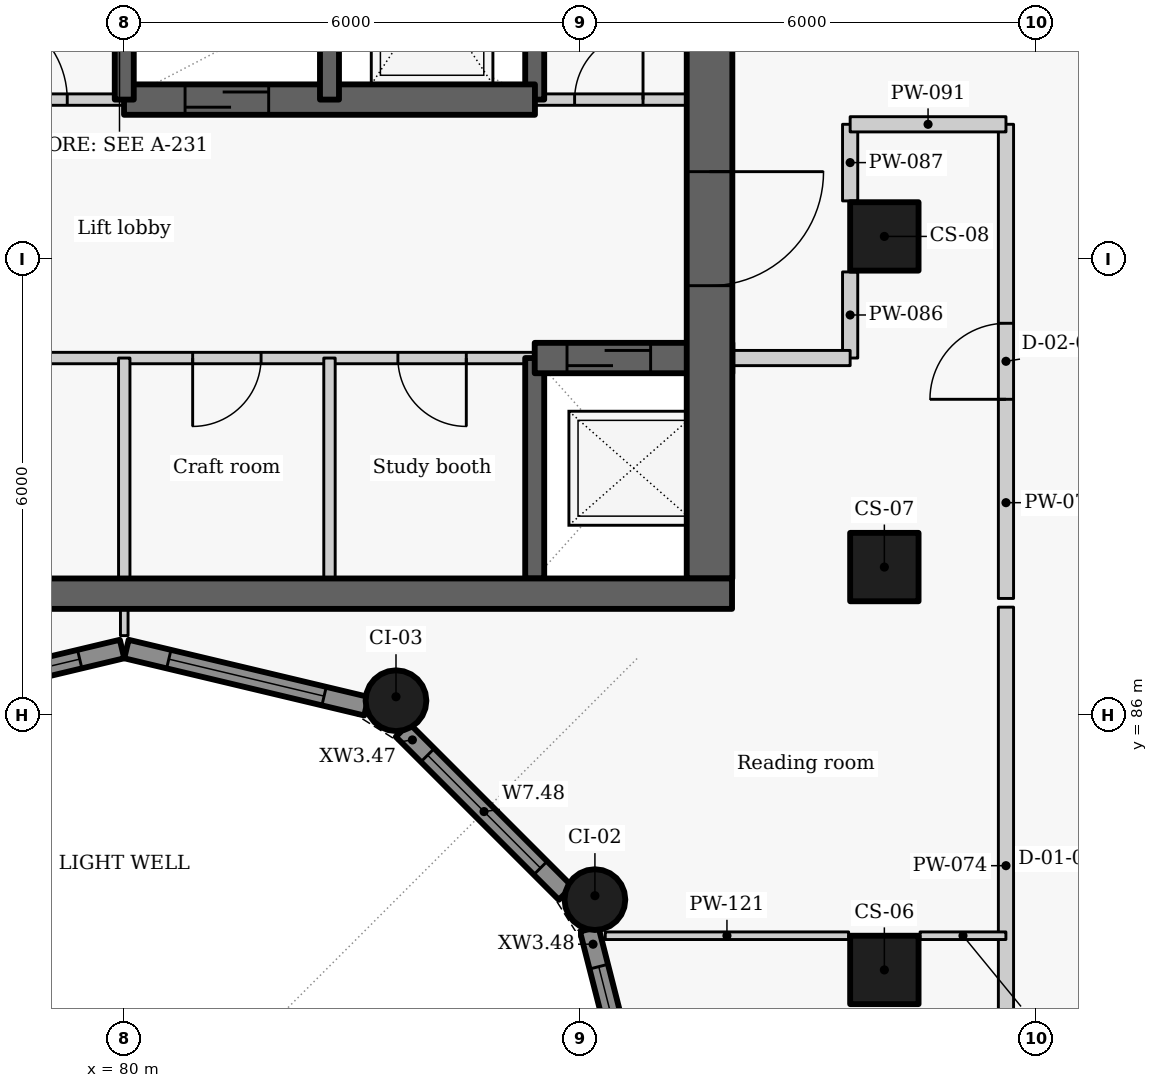
"""IFC4 building model, lengths in metres.
Left out: names, types, materials, properties, quantities, classifications, styles, units other than length and angle.
Written with IfcOpenShell. Run it as: python <this file> out.ifc"""

import sys

from ifc_helpers import new_model, si_unit, direction, frame, frame_2d, origin, origin_2d, place, context, subcontext, project, spatial, rectangle, circle, extrude, element, fill, save


model = new_model("IFC4")
c1 = context("Model", 3, precision=1e-05, world=origin(), true_north=direction((0.0, 1.0)))
c2 = subcontext(c1, "Body", "Model", "MODEL_VIEW")
j1 = project(units=[si_unit("LENGTHUNIT", "METRE"), si_unit("PLANEANGLEUNIT", "RADIAN")], contexts=[c1])
p1 = place(None, origin())
s1 = spatial("IfcSite", under=j1, at=p1, CompositionType="ELEMENT")
p2 = place(p1, origin())
s2 = spatial("IfcBuilding", under=s1, at=p2, CompositionType="ELEMENT")
p3 = place(p2, frame((0.0, 0.0, 176.7)))
s3 = spatial("IfcBuildingStorey", under=s2, at=p3, CompositionType="ELEMENT", Elevation=176.7)
for number, where, z_axis, x_axis in (
    (1, (90.0, 82.65, 0.0), (0.0, 0.0, 1.0), (0.0, 1.0, 0.0)),
    (2, (90.0, 87.95, 0.0), (0.0, 0.0, 1.0), (0.0, 1.0, 0.0)),
    (3, (90.0, 92.3, 0.0), (0.0, 0.0, 1.0), (0.0, 1.0, 0.0)),
):
    element("IfcColumn", number, at=place(p3, frame(where, z_axis=z_axis, x_axis=x_axis)), inside=s3, PredefinedType="COLUMN", context=c2, shape_type="SweptSolid", body=[
        extrude(rectangle(XDim=0.9, YDim=0.9, at=origin_2d()), origin(), (0.0, 0.0, 1.0), 3.3),
    ])
for number, where, z_axis, x_axis in (
    (4, (86.192, 83.575, 0.0), (0.0, 0.0, 1.0), (-0.5, 0.866, 0.0)),
    (5, (83.575, 86.192, 0.0), (0.0, 0.0, 1.0), (-0.866, 0.5, 0.0)),
):
    element("IfcColumn", number, at=place(p3, frame(where, z_axis=z_axis, x_axis=x_axis)), inside=s3, PredefinedType="COLUMN", context=c2, shape_type="SweptSolid", body=[
        extrude(circle(Radius=0.4, at=origin_2d()), origin(), (0.0, 0.0, 1.0), 3.3),
    ])
p4 = place(p3, frame((76.814, 86.119, 0.0), z_axis=(0.0, 0.0, 1.0), x_axis=(0.972773113459, 0.231759508395, 0.0)))
e6 = element("IfcWall", 6, at=p4, inside=s3, PredefinedType="SOLIDWALL", context=c2, shape_type="SweptSolid", body=[
    extrude(rectangle(XDim=3.246, YDim=0.25, at=frame_2d((1.623, 0.0))), origin(), (0.0, 0.0, 1.0), 2.425),
])
p5 = place(p4, frame((0.573, 0.0, 0.9)))
e7 = element("IfcOpeningElement", 7, at=p5, cuts=e6, PredefinedType="OPENING", context=c2, shape_type="SweptSolid", body=[
    extrude(rectangle(XDim=2.1, YDim=1.1, at=frame_2d((1.05, 0.55))), frame((0.0, 0.135, 0.0), z_axis=(0.0, -1.0, 0.0), x_axis=(1.0, 0.0, 0.0)), (0.0, 0.0, 1.0), 0.27),
])
p6 = place(p3, frame((80.029, 86.872, 0.0), z_axis=(0.0, 0.0, 1.0), x_axis=(0.972773113459, -0.231759508395, 0.0)))
e8 = element("IfcWall", 8, at=p6, inside=s3, PredefinedType="SOLIDWALL", context=c2, shape_type="SweptSolid", body=[
    extrude(rectangle(XDim=3.246, YDim=0.25, at=frame_2d((1.623, 0.0))), origin(), (0.0, 0.0, 1.0), 2.425),
])
p7 = place(p6, frame((0.573, 0.0, 0.9)))
e9 = element("IfcOpeningElement", 9, at=p7, cuts=e8, PredefinedType="OPENING", context=c2, shape_type="SweptSolid", body=[
    extrude(rectangle(XDim=2.1, YDim=1.1, at=frame_2d((1.05, 0.55))), frame((0.0, 0.135, 0.0), z_axis=(0.0, -1.0, 0.0), x_axis=(1.0, 0.0, 0.0)), (0.0, 0.0, 1.0), 0.27),
])
p8 = place(p3, frame((83.661, 85.806, 0.0), z_axis=(0.0, 0.0, 1.0), x_axis=(0.707106781187, -0.707106781187, 0.0)))
e10 = element("IfcWall", 10, at=p8, inside=s3, PredefinedType="SOLIDWALL", context=c2, shape_type="SweptSolid", body=[
    extrude(rectangle(XDim=3.033, YDim=0.25, at=frame_2d((1.517, 0.0))), origin(), (0.0, 0.0, 1.0), 2.425),
])
p9 = place(p8, frame((0.467, 0.0, 0.9)))
e11 = element("IfcOpeningElement", 11, at=p9, cuts=e10, PredefinedType="OPENING", context=c2, shape_type="SweptSolid", body=[
    extrude(rectangle(XDim=2.1, YDim=1.1, at=frame_2d((1.05, 0.55))), frame((0.0, 0.135, 0.0), z_axis=(0.0, -1.0, 0.0), x_axis=(1.0, 0.0, 0.0)), (0.0, 0.0, 1.0), 0.27),
])
p10 = place(p3, frame((86.117, 83.187, 0.0), z_axis=(0.0, 0.0, 1.0), x_axis=(0.247055971283, -0.969001211069, 0.0)))
e12 = element("IfcWall", 12, at=p10, inside=s3, PredefinedType="SOLIDWALL", context=c2, shape_type="SweptSolid", body=[
    extrude(rectangle(XDim=3.01, YDim=0.25, at=frame_2d((1.505, 0.0))), origin(), (0.0, 0.0, 1.0), 2.425),
])
p11 = place(p10, frame((0.51, 0.0, 0.9)))
e13 = element("IfcOpeningElement", 13, at=p11, cuts=e12, PredefinedType="OPENING", context=c2, shape_type="SweptSolid", body=[
    extrude(rectangle(XDim=2.1, YDim=1.1, at=frame_2d((1.05, 0.55))), frame((0.0, 0.135, 0.0), z_axis=(0.0, -1.0, 0.0), x_axis=(1.0, 0.0, 0.0)), (0.0, 0.0, 1.0), 0.27),
])
p12 = place(p3, frame((85.4, 90.7, 0.0), z_axis=(0.0, 0.0, 1.0), x_axis=(-1.0, 0.0, 0.0)))
e14 = element("IfcWall", 14, at=p12, inside=s3, PredefinedType="PARTITIONING", context=c2, shape_type="SweptSolid", body=[
    extrude(rectangle(XDim=13.4, YDim=0.15, at=frame_2d((6.7, 0.0))), origin(), (0.0, 0.0, 1.0), 3.025),
])
p13 = place(p12, frame((11.325, 0.0, 0.0)))
e15 = element("IfcOpeningElement", 15, at=p13, cuts=e14, PredefinedType="OPENING", context=c2, shape_type="SweptSolid", body=[
    extrude(rectangle(XDim=0.9, YDim=2.1, at=frame_2d((0.45, 1.05))), frame((0.0, 0.085, 0.0), z_axis=(0.0, -1.0, 0.0), x_axis=(1.0, 0.0, 0.0)), (0.0, 0.0, 1.0), 0.17),
])
p14 = place(p12, frame((7.65, 0.0, 0.0)))
e16 = element("IfcOpeningElement", 16, at=p14, cuts=e14, PredefinedType="OPENING", context=c2, shape_type="SweptSolid", body=[
    extrude(rectangle(XDim=0.9, YDim=2.1, at=frame_2d((0.45, 1.05))), frame((0.0, 0.085, 0.0), z_axis=(0.0, -1.0, 0.0), x_axis=(1.0, 0.0, 0.0)), (0.0, 0.0, 1.0), 0.17),
])
p15 = place(p12, frame((3.6, 0.0, 0.0)))
e17 = element("IfcOpeningElement", 17, at=p15, cuts=e14, PredefinedType="OPENING", context=c2, shape_type="SweptSolid", body=[
    extrude(rectangle(XDim=0.9, YDim=2.1, at=frame_2d((0.45, 1.05))), frame((0.0, 0.085, 0.0), z_axis=(0.0, -1.0, 0.0), x_axis=(1.0, 0.0, 0.0)), (0.0, 0.0, 1.0), 0.17),
])
p16 = place(p12, frame((0.9, 0.0, 0.0)))
e18 = element("IfcOpeningElement", 18, at=p16, cuts=e14, PredefinedType="OPENING", context=c2, shape_type="SweptSolid", body=[
    extrude(rectangle(XDim=0.9, YDim=2.1, at=frame_2d((0.45, 1.05))), frame((0.0, 0.085, 0.0), z_axis=(0.0, -1.0, 0.0), x_axis=(1.0, 0.0, 0.0)), (0.0, 0.0, 1.0), 0.17),
])
p17 = place(p3, frame((85.4, 87.8, -0.41), z_axis=(0.0, 0.0, 1.0), x_axis=(0.0, 1.0, 0.0)))
e19 = element("IfcWall", 19, at=p17, inside=s3, PredefinedType="SHEAR", context=c2, shape_type="SweptSolid", body=[
    extrude(rectangle(XDim=2.9, YDim=0.25, at=frame_2d((1.45, 0.0))), origin(), (0.0, 0.0, 1.0), 3.435),
])
p18 = place(p3, frame((85.4, 94.1, -0.41), z_axis=(0.0, 0.0, 1.0), x_axis=(0.0, 1.0, 0.0)))
e20 = element("IfcWall", 20, at=p18, inside=s3, PredefinedType="SHEAR", context=c2, shape_type="SweptSolid", body=[
    extrude(rectangle(XDim=2.8, YDim=0.25, at=frame_2d((1.4, 0.0))), origin(), (0.0, 0.0, 1.0), 3.435),
])
p19 = place(p3, frame((85.4, 90.7, -0.41), z_axis=(0.0, 0.0, 1.0), x_axis=(1.0, 0.0, 0.0)))
e21 = element("IfcWall", 21, at=p19, inside=s3, PredefinedType="SHEAR", context=c2, shape_type="SweptSolid", body=[
    extrude(rectangle(XDim=2.6, YDim=0.4, at=frame_2d((1.3, 0.0))), origin(), (0.0, 0.0, 1.0), 3.435),
])
p20 = place(p19, frame((0.425, 0.0, 0.41)))
e22 = element("IfcOpeningElement", 22, at=p20, cuts=e21, PredefinedType="OPENING", context=c2, shape_type="SweptSolid", body=[
    extrude(rectangle(XDim=1.1, YDim=2.1, at=frame_2d((0.55, 1.05))), frame((0.0, 0.21, 0.0), z_axis=(0.0, -1.0, 0.0), x_axis=(1.0, 0.0, 0.0)), (0.0, 0.0, 1.0), 0.42),
])
p21 = place(p3, frame((87.7, 102.05, -0.41), z_axis=(0.0, 0.0, 1.0), x_axis=(0.0, -1.0, 0.0)))
e23 = element("IfcWall", 23, at=p21, inside=s3, PredefinedType="SHEAR", context=c2, shape_type="SweptSolid", body=[
    extrude(rectangle(XDim=14.25, YDim=0.6, at=frame_2d((7.125, 0.0))), origin(), (0.0, 0.0, 1.0), 3.435),
])
p22 = place(p21, frame((8.898, 0.0, 0.41)))
e24 = element("IfcOpeningElement", 24, at=p22, cuts=e23, PredefinedType="OPENING", context=c2, shape_type="SweptSolid", body=[
    extrude(rectangle(XDim=1.5, YDim=2.1, at=frame_2d((0.75, 1.05))), frame((0.0, 0.31, 0.0), z_axis=(0.0, -1.0, 0.0), x_axis=(1.0, 0.0, 0.0)), (0.0, 0.0, 1.0), 0.62),
])
for number, where, z_axis, x_axis in (
    (25, (80.0, 87.8, 0.0), (0.0, 0.0, 1.0), (0.0, 1.0, 0.0)),
    (26, (82.7, 87.8, 0.0), (0.0, 0.0, 1.0), (0.0, 1.0, 0.0)),
):
    element("IfcWall", number, at=place(p3, frame(where, z_axis=z_axis, x_axis=x_axis)), inside=s3, PredefinedType="PARTITIONING", context=c2, shape_type="SweptSolid", body=[
        extrude(rectangle(XDim=2.9, YDim=0.15, at=frame_2d((1.45, 0.0))), origin(), (0.0, 0.0, 1.0), 3.025),
    ])
p23 = place(p3, frame((77.297, 94.1, 0.0), z_axis=(0.0, 0.0, 1.0), x_axis=(1.0, 0.0, 0.0)))
e27 = element("IfcWall", 27, at=p23, inside=s3, PredefinedType="PARTITIONING", context=c2, shape_type="SweptSolid", body=[
    extrude(rectangle(XDim=2.706, YDim=0.15, at=frame_2d((1.353, 0.0))), origin(), (0.0, 0.0, 1.0), 3.025),
])
p24 = place(p23, frame((0.753, 0.0, 0.0)))
e28 = element("IfcOpeningElement", 28, at=p24, cuts=e27, PredefinedType="OPENING", context=c2, shape_type="SweptSolid", body=[
    extrude(rectangle(XDim=1.2, YDim=2.1, at=frame_2d((0.6, 1.05))), frame((0.0, 0.085, 0.0), z_axis=(0.0, -1.0, 0.0), x_axis=(1.0, 0.0, 0.0)), (0.0, 0.0, 1.0), 0.17),
])
p25 = place(p3, frame((85.397, 94.1, 0.0), z_axis=(0.0, 0.0, 1.0), x_axis=(1.0, 0.0, 0.0)))
e29 = element("IfcWall", 29, at=p25, inside=s3, PredefinedType="PARTITIONING", context=c2, shape_type="SweptSolid", body=[
    extrude(rectangle(XDim=2.603, YDim=0.15, at=frame_2d((1.302, 0.0))), origin(), (0.0, 0.0, 1.0), 3.025),
])
p26 = place(p25, frame((0.528, 0.0, 0.0)))
e30 = element("IfcOpeningElement", 30, at=p26, cuts=e29, PredefinedType="OPENING", context=c2, shape_type="SweptSolid", body=[
    extrude(rectangle(XDim=0.9, YDim=2.1, at=frame_2d((0.45, 1.05))), frame((0.0, 0.085, 0.0), z_axis=(0.0, -1.0, 0.0), x_axis=(1.0, 0.0, 0.0)), (0.0, 0.0, 1.0), 0.17),
])
p27 = place(p3, frame((79.997, 94.1, -0.41), z_axis=(0.0, 0.0, 1.0), x_axis=(1.0, 0.0, 0.0)))
e31 = element("IfcWall", 31, at=p27, inside=s3, PredefinedType="SHEAR", context=c2, shape_type="SweptSolid", body=[
    extrude(rectangle(XDim=5.406, YDim=0.4, at=frame_2d((2.703, 0.0))), origin(), (0.0, 0.0, 1.0), 3.435),
])
p28 = place(p27, frame((0.803, 0.0, 0.41)))
e32 = element("IfcOpeningElement", 32, at=p28, cuts=e31, PredefinedType="OPENING", context=c2, shape_type="SweptSolid", body=[
    extrude(rectangle(XDim=1.1, YDim=2.1, at=frame_2d((0.55, 1.05))), frame((0.0, 0.21, 0.0), z_axis=(0.0, -1.0, 0.0), x_axis=(1.0, 0.0, 0.0)), (0.0, 0.0, 1.0), 0.42),
])
for number, where, z_axis, x_axis in (
    (33, (80.0, 94.1, -0.41), (0.0, 0.0, 1.0), (0.0, 1.0, 0.0)),
    (34, (82.7, 94.1, -0.41), (0.0, 0.0, 1.0), (0.0, 1.0, 0.0)),
):
    element("IfcWall", number, at=place(p3, frame(where, z_axis=z_axis, x_axis=x_axis)), inside=s3, PredefinedType="SHEAR", context=c2, shape_type="SweptSolid", body=[
        extrude(rectangle(XDim=2.8, YDim=0.25, at=frame_2d((1.4, 0.0))), origin(), (0.0, 0.0, 1.0), 3.435),
    ])
p29 = place(p3, frame((91.6, 76.937, 0.0), z_axis=(0.0, 0.0, 1.0), x_axis=(0.0, 1.0, 0.0)))
e35 = element("IfcWall", 35, at=p29, inside=s3, PredefinedType="PARTITIONING", context=c2, shape_type="SweptSolid", body=[
    extrude(rectangle(XDim=10.486, YDim=0.2, at=frame_2d((5.243, 0.0))), origin(), (0.0, 0.0, 1.0), 3.025),
])
p30 = place(p29, frame((2.583, 0.0, 0.0)))
e36 = element("IfcOpeningElement", 36, at=p30, cuts=e35, PredefinedType="OPENING", context=c2, shape_type="SweptSolid", body=[
    extrude(rectangle(XDim=1.0, YDim=2.1, at=frame_2d((0.5, 1.05))), frame((0.0, 0.11, 0.0), z_axis=(0.0, -1.0, 0.0), x_axis=(1.0, 0.0, 0.0)), (0.0, 0.0, 1.0), 0.22),
])
p31 = place(p3, frame((91.6, 87.537, 0.0), z_axis=(0.0, 0.0, 1.0), x_axis=(0.0, 1.0, 0.0)))
e37 = element("IfcWall", 37, at=p31, inside=s3, PredefinedType="PARTITIONING", context=c2, shape_type="SweptSolid", body=[
    extrude(rectangle(XDim=6.238, YDim=0.2, at=frame_2d((3.119, 0.0))), origin(), (0.0, 0.0, 1.0), 3.025),
])
p32 = place(p31, frame((2.62, 0.0, 0.0)))
e38 = element("IfcOpeningElement", 38, at=p32, cuts=e37, PredefinedType="OPENING", context=c2, shape_type="SweptSolid", body=[
    extrude(rectangle(XDim=1.0, YDim=2.1, at=frame_2d((0.5, 1.05))), frame((0.0, 0.11, 0.0), z_axis=(0.0, -1.0, 0.0), x_axis=(1.0, 0.0, 0.0)), (0.0, 0.0, 1.0), 0.22),
])
p33 = place(p3, frame((89.55, 90.7, 0.0), z_axis=(0.0, 0.0, 1.0), x_axis=(0.0, 1.0, 0.0)))
e39 = element("IfcWall", 39, at=p33, inside=s3, PredefinedType="PARTITIONING", context=c2, shape_type="SweptSolid", body=[
    extrude(rectangle(XDim=1.133, YDim=0.2, at=frame_2d((0.566, 0.0))), origin(), (0.0, 0.0, 1.0), 3.025),
])
p34 = place(p3, frame((89.55, 92.767, 0.0), z_axis=(0.0, 0.0, 1.0), x_axis=(0.0, 1.0, 0.0)))
e40 = element("IfcWall", 40, at=p34, inside=s3, PredefinedType="PARTITIONING", context=c2, shape_type="SweptSolid", body=[
    extrude(rectangle(XDim=1.008, YDim=0.2, at=frame_2d((0.504, 0.0))), origin(), (0.0, 0.0, 1.0), 3.025),
])
p35 = place(p3, frame((89.55, 93.775, 0.0), z_axis=(0.0, 0.0, 1.0), x_axis=(1.0, 0.0, 0.0)))
e41 = element("IfcWall", 41, at=p35, inside=s3, PredefinedType="PARTITIONING", context=c2, shape_type="SweptSolid", body=[
    extrude(rectangle(XDim=2.05, YDim=0.2, at=frame_2d((1.025, 0.0))), origin(), (0.0, 0.0, 1.0), 2.505),
])
p36 = place(p3, frame((88.0, 90.7, 0.0), z_axis=(0.0, 0.0, 1.0), x_axis=(1.0, 0.0, 0.0)))
e42 = element("IfcWall", 42, at=p36, inside=s3, PredefinedType="PARTITIONING", context=c2, shape_type="SweptSolid", body=[
    extrude(rectangle(XDim=1.55, YDim=0.2, at=frame_2d((0.775, 0.0))), origin(), (0.0, 0.0, 1.0), 3.025),
])
p37 = place(p3, frame((80.0, 87.048, 0.0), z_axis=(0.0, 0.0, 1.0), x_axis=(0.0, 1.0, 0.0)))
e43 = element("IfcWall", 43, at=p37, inside=s3, PredefinedType="PARTITIONING", context=c2, shape_type="SweptSolid", body=[
    extrude(rectangle(XDim=0.352, YDim=0.1, at=frame_2d((0.176, 0.0))), origin(), (0.0, 0.0, 1.0), 3.025),
])
p38 = place(p3, frame((86.328, 83.1, 0.0), z_axis=(0.0, 0.0, 1.0), x_axis=(1.0, 0.0, 0.0)))
e44 = element("IfcWall", 44, at=p38, inside=s3, PredefinedType="PARTITIONING", context=c2, shape_type="SweptSolid", body=[
    extrude(rectangle(XDim=3.202, YDim=0.1, at=frame_2d((1.601, 0.0))), origin(), (0.0, 0.0, 1.0), 3.025),
])
p39 = place(p3, frame((90.47, 83.1, 0.0), z_axis=(0.0, 0.0, 1.0), x_axis=(1.0, 0.0, 0.0)))
e45 = element("IfcWall", 45, at=p39, inside=s3, PredefinedType="PARTITIONING", context=c2, shape_type="SweptSolid", body=[
    extrude(rectangle(XDim=1.129, YDim=0.1, at=frame_2d((0.564, 0.0))), origin(), (0.0, 0.0, 1.0), 3.025),
])
p40 = place(p3, frame((72.004, 87.6, -0.41), z_axis=(0.0, 0.0, 1.0), x_axis=(1.0, 0.0, 0.0)))
e46 = element("IfcWall", 46, at=p40, inside=s3, PredefinedType="SHEAR", context=c2, shape_type="SweptSolid", body=[
    extrude(rectangle(XDim=15.992, YDim=0.4, at=frame_2d((7.996, 0.0))), origin(), (0.0, 0.0, 1.0), 3.435),
])
p41 = place(p5, origin())
e47 = element("IfcWindow", 47, at=p41, inside=s3, PartitioningType="SINGLE_PANEL", PredefinedType="WINDOW", context=c2, shape_type="SweptSolid", body=[
    extrude(rectangle(XDim=2.1, YDim=1.1, at=frame_2d((1.05, 0.55))), frame((0.0, 0.03, 0.0), z_axis=(0.0, -1.0, 0.0), x_axis=(1.0, 0.0, 0.0)), (0.0, 0.0, 1.0), 0.06),
])
fill(e7, e47)
p42 = place(p7, origin())
e48 = element("IfcWindow", 48, at=p42, inside=s3, PartitioningType="SINGLE_PANEL", PredefinedType="WINDOW", context=c2, shape_type="SweptSolid", body=[
    extrude(rectangle(XDim=2.1, YDim=1.1, at=frame_2d((1.05, 0.55))), frame((0.0, 0.03, 0.0), z_axis=(0.0, -1.0, 0.0), x_axis=(1.0, 0.0, 0.0)), (0.0, 0.0, 1.0), 0.06),
])
fill(e9, e48)
p43 = place(p9, origin())
e49 = element("IfcWindow", 49, at=p43, inside=s3, PartitioningType="SINGLE_PANEL", PredefinedType="WINDOW", context=c2, shape_type="SweptSolid", body=[
    extrude(rectangle(XDim=2.1, YDim=1.1, at=frame_2d((1.05, 0.55))), frame((0.0, 0.03, 0.0), z_axis=(0.0, -1.0, 0.0), x_axis=(1.0, 0.0, 0.0)), (0.0, 0.0, 1.0), 0.06),
])
fill(e11, e49)
p44 = place(p11, origin())
e50 = element("IfcWindow", 50, at=p44, inside=s3, PartitioningType="SINGLE_PANEL", PredefinedType="WINDOW", context=c2, shape_type="SweptSolid", body=[
    extrude(rectangle(XDim=2.1, YDim=1.1, at=frame_2d((1.05, 0.55))), frame((0.0, 0.03, 0.0), z_axis=(0.0, -1.0, 0.0), x_axis=(1.0, 0.0, 0.0)), (0.0, 0.0, 1.0), 0.06),
])
fill(e13, e50)
p45 = place(p20, origin())
e51 = element("IfcDoor", 51, at=p45, inside=s3, OperationType="SLIDING_TO_LEFT", PredefinedType="DOOR", context=c2, shape_type="SweptSolid", body=[
    extrude(rectangle(XDim=1.1, YDim=2.1, at=frame_2d((0.55, 1.05))), frame((0.0, 0.025, 0.0), z_axis=(0.0, -1.0, 0.0), x_axis=(1.0, 0.0, 0.0)), (0.0, 0.0, 1.0), 0.05),
])
fill(e22, e51)
p46 = place(p15, origin())
e52 = element("IfcDoor", 52, at=p46, inside=s3, OperationType="SINGLE_SWING_RIGHT", PredefinedType="DOOR", context=c2, shape_type="SweptSolid", body=[
    extrude(rectangle(XDim=0.9, YDim=2.1, at=frame_2d((0.45, 1.05))), frame((0.0, 0.025, 0.0), z_axis=(0.0, -1.0, 0.0), x_axis=(1.0, 0.0, 0.0)), (0.0, 0.0, 1.0), 0.05),
])
fill(e17, e52)
p47 = place(p16, origin())
e53 = element("IfcDoor", 53, at=p47, inside=s3, OperationType="SINGLE_SWING_LEFT", PredefinedType="DOOR", context=c2, shape_type="SweptSolid", body=[
    extrude(rectangle(XDim=0.9, YDim=2.1, at=frame_2d((0.45, 1.05))), frame((0.0, 0.025, 0.0), z_axis=(0.0, -1.0, 0.0), x_axis=(1.0, 0.0, 0.0)), (0.0, 0.0, 1.0), 0.05),
])
fill(e18, e53)
p48 = place(p24, origin())
e54 = element("IfcDoor", 54, at=p48, inside=s3, OperationType="DOUBLE_DOOR_SINGLE_SWING", PredefinedType="DOOR", context=c2, shape_type="SweptSolid", body=[
    extrude(rectangle(XDim=1.2, YDim=2.1, at=frame_2d((0.6, 1.05))), frame((0.0, 0.025, 0.0), z_axis=(0.0, -1.0, 0.0), x_axis=(1.0, 0.0, 0.0)), (0.0, 0.0, 1.0), 0.05),
])
fill(e28, e54)
p49 = place(p28, origin())
e55 = element("IfcDoor", 55, at=p49, inside=s3, OperationType="SLIDING_TO_LEFT", PredefinedType="DOOR", context=c2, shape_type="SweptSolid", body=[
    extrude(rectangle(XDim=1.1, YDim=2.1, at=frame_2d((0.55, 1.05))), frame((0.0, 0.025, 0.0), z_axis=(0.0, -1.0, 0.0), x_axis=(1.0, 0.0, 0.0)), (0.0, 0.0, 1.0), 0.05),
])
fill(e32, e55)
p50 = place(p26, origin())
e56 = element("IfcDoor", 56, at=p50, inside=s3, OperationType="SINGLE_SWING_RIGHT", PredefinedType="DOOR", context=c2, shape_type="SweptSolid", body=[
    extrude(rectangle(XDim=0.9, YDim=2.1, at=frame_2d((0.45, 1.05))), frame((0.0, 0.025, 0.0), z_axis=(0.0, -1.0, 0.0), x_axis=(1.0, 0.0, 0.0)), (0.0, 0.0, 1.0), 0.05),
])
fill(e30, e56)
p51 = place(p32, origin())
e57 = element("IfcDoor", 57, at=p51, inside=s3, OperationType="SINGLE_SWING_LEFT", PredefinedType="DOOR", context=c2, shape_type="SweptSolid", body=[
    extrude(rectangle(XDim=1.0, YDim=2.1, at=frame_2d((0.5, 1.05))), frame((0.0, 0.025, 0.0), z_axis=(0.0, -1.0, 0.0), x_axis=(1.0, 0.0, 0.0)), (0.0, 0.0, 1.0), 0.05),
])
fill(e38, e57)
p52 = place(p22, origin())
e58 = element("IfcDoor", 58, at=p52, inside=s3, OperationType="DOUBLE_DOOR_SINGLE_SWING", PredefinedType="DOOR", context=c2, shape_type="SweptSolid", body=[
    extrude(rectangle(XDim=1.5, YDim=2.1, at=frame_2d((0.75, 1.05))), frame((0.0, 0.025, 0.0), z_axis=(0.0, -1.0, 0.0), x_axis=(1.0, 0.0, 0.0)), (0.0, 0.0, 1.0), 0.05),
])
fill(e24, e58)
save(model, sys.argv[1])
